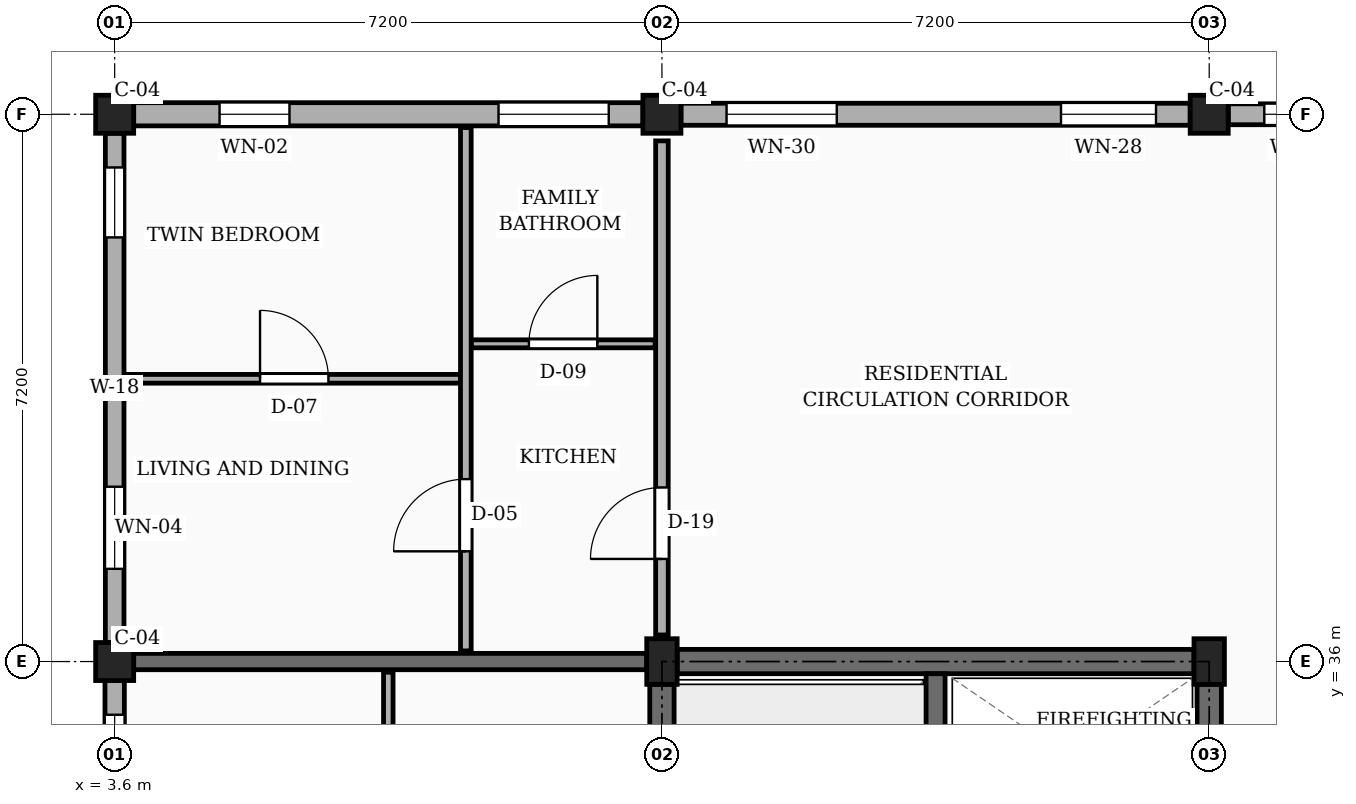
"""IFC4 building model, lengths in metres.
Left out: names, types, materials, properties, quantities, classifications, styles, units other than length and angle.
Written with IfcOpenShell. Run it as: python <this file> out.ifc"""

import sys

from ifc_helpers import new_model, si_unit, direction, frame, frame_2d, origin, origin_2d, place, context, subcontext, project, spatial, rectangle, extrude, element, fill, save


model = new_model("IFC4")
c1 = context("Model", 3, precision=1e-05, world=origin(), true_north=direction((0.0, 1.0)))
c2 = subcontext(c1, "Body", "Model", "MODEL_VIEW")
j1 = project(units=[si_unit("LENGTHUNIT", "METRE"), si_unit("PLANEANGLEUNIT", "RADIAN")], contexts=[c1])
p1 = place(None, origin())
s1 = spatial("IfcSite", under=j1, at=p1, CompositionType="ELEMENT")
p2 = place(p1, origin())
s2 = spatial("IfcBuilding", under=s1, at=p2, CompositionType="ELEMENT")
p3 = place(p2, frame((0.0, 0.0, 29.7)))
s3 = spatial("IfcBuildingStorey", under=s2, at=p3, CompositionType="ELEMENT", Elevation=29.7)
for number, where, z_axis, x_axis in (
    (1, (3.6, 36.0, 0.0), (0.0, 0.0, 1.0), (1.0, 0.0, 0.0)),
    (2, (3.6, 43.2, 0.0), (0.0, 0.0, 1.0), (1.0, 0.0, 0.0)),
):
    element("IfcColumn", number, at=place(p3, frame(where, z_axis=z_axis, x_axis=x_axis)), inside=s3, PredefinedType="COLUMN", context=c2, shape_type="SweptSolid", body=[
        extrude(rectangle(XDim=0.5, YDim=0.5, at=origin_2d()), origin(), (0.0, 0.0, 1.0), 3.15),
    ])
p4 = place(p3, frame((10.8, 36.0, 0.0), z_axis=(0.0, 0.0, 1.0), x_axis=(1.0, 0.0, 0.0)))
e3 = element("IfcColumn", 3, at=p4, inside=s3, PredefinedType="COLUMN", context=c2, shape_type="SweptSolid", body=[
    extrude(rectangle(XDim=0.4, YDim=0.6, at=origin_2d()), origin(), (0.0, 0.0, 1.0), 3.15),
])
p5 = place(p3, frame((10.8, 43.2, 0.0), z_axis=(0.0, 0.0, 1.0), x_axis=(1.0, 0.0, 0.0)))
e4 = element("IfcColumn", 4, at=p5, inside=s3, PredefinedType="COLUMN", context=c2, shape_type="SweptSolid", body=[
    extrude(rectangle(XDim=0.5, YDim=0.5, at=origin_2d()), origin(), (0.0, 0.0, 1.0), 3.15),
])
p6 = place(p3, frame((18.0, 36.0, 0.0), z_axis=(0.0, 0.0, 1.0), x_axis=(1.0, 0.0, 0.0)))
e5 = element("IfcColumn", 5, at=p6, inside=s3, PredefinedType="COLUMN", context=c2, shape_type="SweptSolid", body=[
    extrude(rectangle(XDim=0.4, YDim=0.6, at=origin_2d()), origin(), (0.0, 0.0, 1.0), 3.15),
])
p7 = place(p3, frame((18.0, 43.2, 0.0), z_axis=(0.0, 0.0, 1.0), x_axis=(1.0, 0.0, 0.0)))
e6 = element("IfcColumn", 6, at=p7, inside=s3, PredefinedType="COLUMN", context=c2, shape_type="SweptSolid", body=[
    extrude(rectangle(XDim=0.5, YDim=0.5, at=origin_2d()), origin(), (0.0, 0.0, 1.0), 3.15),
])
p8 = place(p3, frame((3.85, 36.0, 0.0), z_axis=(0.0, 0.0, 1.0), x_axis=(1.0, 0.0, 0.0)))
e7 = element("IfcWall", 7, at=p8, inside=s3, PredefinedType="SOLIDWALL", context=c2, shape_type="SweptSolid", body=[
    extrude(rectangle(XDim=6.75, YDim=0.215, at=frame_2d((3.375, 0.0))), origin(), (0.0, 0.0, 1.0), 2.17),
])
p9 = place(p3, frame((24.95, 43.2, 0.0), z_axis=(0.0, 0.0, 1.0), x_axis=(-1.0, 0.0, 0.0)))
e8 = element("IfcWall", 8, at=p9, inside=s3, PredefinedType="SOLIDWALL", context=c2, shape_type="SweptSolid", body=[
    extrude(rectangle(XDim=6.7, YDim=0.275, at=frame_2d((3.35, 0.0))), origin(), (0.0, 0.0, 1.0), 2.44),
])
p10 = place(p9, frame((0.495, 0.0, 0.78)))
e9 = element("IfcOpeningElement", 9, at=p10, cuts=e8, PredefinedType="OPENING", context=c2, shape_type="SweptSolid", body=[
    extrude(rectangle(XDim=0.94, YDim=1.44, at=frame_2d((0.47, 0.72))), frame((0.0, 0.147, 0.0), z_axis=(0.0, -1.0, 0.0), x_axis=(1.0, 0.0, 0.0)), (0.0, 0.0, 1.0), 0.295),
])
p11 = place(p9, frame((2.745, 0.0, 0.78)))
e10 = element("IfcOpeningElement", 10, at=p11, cuts=e8, PredefinedType="OPENING", context=c2, shape_type="SweptSolid", body=[
    extrude(rectangle(XDim=1.15, YDim=1.44, at=frame_2d((0.575, 0.72))), frame((0.0, 0.147, 0.0), z_axis=(0.0, -1.0, 0.0), x_axis=(1.0, 0.0, 0.0)), (0.0, 0.0, 1.0), 0.295),
])
p12 = place(p9, frame((5.185, 0.0, 0.78)))
e11 = element("IfcOpeningElement", 11, at=p12, cuts=e8, PredefinedType="OPENING", context=c2, shape_type="SweptSolid", body=[
    extrude(rectangle(XDim=1.04, YDim=1.26, at=frame_2d((0.52, 0.63))), frame((0.0, 0.147, 0.0), z_axis=(0.0, -1.0, 0.0), x_axis=(1.0, 0.0, 0.0)), (0.0, 0.0, 1.0), 0.295),
])
p13 = place(p3, frame((17.75, 43.2, 0.0), z_axis=(0.0, 0.0, 1.0), x_axis=(-1.0, 0.0, 0.0)))
e12 = element("IfcWall", 12, at=p13, inside=s3, PredefinedType="SOLIDWALL", context=c2, shape_type="SweptSolid", body=[
    extrude(rectangle(XDim=6.7, YDim=0.29, at=frame_2d((3.35, 0.0))), origin(), (0.0, 0.0, 1.0), 2.44),
])
p14 = place(p13, frame((0.45, 0.0, 0.78)))
e13 = element("IfcOpeningElement", 13, at=p14, cuts=e12, PredefinedType="OPENING", context=c2, shape_type="SweptSolid", body=[
    extrude(rectangle(XDim=1.25, YDim=1.44, at=frame_2d((0.625, 0.72))), frame((0.0, 0.155, 0.0), z_axis=(0.0, -1.0, 0.0), x_axis=(1.0, 0.0, 0.0)), (0.0, 0.0, 1.0), 0.31),
])
p15 = place(p13, frame((4.65, 0.0, 0.78)))
e14 = element("IfcOpeningElement", 14, at=p15, cuts=e12, PredefinedType="OPENING", context=c2, shape_type="SweptSolid", body=[
    extrude(rectangle(XDim=1.45, YDim=1.44, at=frame_2d((0.725, 0.72))), frame((0.0, 0.155, 0.0), z_axis=(0.0, -1.0, 0.0), x_axis=(1.0, 0.0, 0.0)), (0.0, 0.0, 1.0), 0.31),
])
p16 = place(p3, frame((10.55, 43.2, 0.0), z_axis=(0.0, 0.0, 1.0), x_axis=(-1.0, 0.0, 0.0)))
e15 = element("IfcWall", 15, at=p16, inside=s3, PredefinedType="SOLIDWALL", context=c2, shape_type="SweptSolid", body=[
    extrude(rectangle(XDim=6.7, YDim=0.305, at=frame_2d((3.35, 0.0))), origin(), (0.0, 0.0, 1.0), 2.44),
])
p17 = place(p16, frame((0.45, 0.0, 0.78)))
e16 = element("IfcOpeningElement", 16, at=p17, cuts=e15, PredefinedType="OPENING", context=c2, shape_type="SweptSolid", body=[
    extrude(rectangle(XDim=1.45, YDim=1.44, at=frame_2d((0.725, 0.72))), frame((0.0, 0.163, 0.0), z_axis=(0.0, -1.0, 0.0), x_axis=(1.0, 0.0, 0.0)), (0.0, 0.0, 1.0), 0.325),
])
p18 = place(p16, frame((4.65, 0.0, 0.78)))
e17 = element("IfcOpeningElement", 17, at=p18, cuts=e15, PredefinedType="OPENING", context=c2, shape_type="SweptSolid", body=[
    extrude(rectangle(XDim=0.92, YDim=1.15, at=frame_2d((0.46, 0.575))), frame((0.0, 0.163, 0.0), z_axis=(0.0, -1.0, 0.0), x_axis=(1.0, 0.0, 0.0)), (0.0, 0.0, 1.0), 0.325),
])
p19 = place(p3, frame((3.6, 42.95, 0.0), z_axis=(0.0, 0.0, 1.0), x_axis=(0.0, -1.0, 0.0)))
e18 = element("IfcWall", 18, at=p19, inside=s3, PredefinedType="SOLIDWALL", context=c2, shape_type="SweptSolid", body=[
    extrude(rectangle(XDim=6.7, YDim=0.245, at=frame_2d((3.35, 0.0))), origin(), (0.0, 0.0, 1.0), 2.44),
])
p20 = place(p19, frame((0.45, 0.0, 0.78)))
e19 = element("IfcOpeningElement", 19, at=p20, cuts=e18, PredefinedType="OPENING", context=c2, shape_type="SweptSolid", body=[
    extrude(rectangle(XDim=0.92, YDim=1.15, at=frame_2d((0.46, 0.575))), frame((0.0, 0.133, 0.0), z_axis=(0.0, -1.0, 0.0), x_axis=(1.0, 0.0, 0.0)), (0.0, 0.0, 1.0), 0.265),
])
p21 = place(p19, frame((4.65, 0.0, 0.78)))
e20 = element("IfcOpeningElement", 20, at=p21, cuts=e18, PredefinedType="OPENING", context=c2, shape_type="SweptSolid", body=[
    extrude(rectangle(XDim=1.08, YDim=1.15, at=frame_2d((0.54, 0.575))), frame((0.0, 0.133, 0.0), z_axis=(0.0, -1.0, 0.0), x_axis=(1.0, 0.0, 0.0)), (0.0, 0.0, 1.0), 0.265),
])
p22 = place(p3, frame((3.6, 35.75, 0.0), z_axis=(0.0, 0.0, 1.0), x_axis=(0.0, -1.0, 0.0)))
e21 = element("IfcWall", 21, at=p22, inside=s3, PredefinedType="SOLIDWALL", context=c2, shape_type="SweptSolid", body=[
    extrude(rectangle(XDim=6.7, YDim=0.255, at=frame_2d((3.35, 0.0))), origin(), (0.0, 0.0, 1.0), 2.44),
])
p23 = place(p22, frame((0.45, 0.0, 0.78)))
e22 = element("IfcOpeningElement", 22, at=p23, cuts=e21, PredefinedType="OPENING", context=c2, shape_type="SweptSolid", body=[
    extrude(rectangle(XDim=1.08, YDim=1.15, at=frame_2d((0.54, 0.575))), frame((0.0, 0.137, 0.0), z_axis=(0.0, -1.0, 0.0), x_axis=(1.0, 0.0, 0.0)), (0.0, 0.0, 1.0), 0.275),
])
p24 = place(p22, frame((4.65, 0.0, 0.78)))
e23 = element("IfcOpeningElement", 23, at=p24, cuts=e21, PredefinedType="OPENING", context=c2, shape_type="SweptSolid", body=[
    extrude(rectangle(XDim=1.24, YDim=1.15, at=frame_2d((0.62, 0.575))), frame((0.0, 0.137, 0.0), z_axis=(0.0, -1.0, 0.0), x_axis=(1.0, 0.0, 0.0)), (0.0, 0.0, 1.0), 0.275),
])
p25 = place(p3, frame((10.8, 29.1, 0.0), z_axis=(0.0, 0.0, 1.0), x_axis=(0.0, 1.0, 0.0)))
e24 = element("IfcWall", 24, at=p25, inside=s3, PredefinedType="SHEAR", context=c2, shape_type="SweptSolid", body=[
    extrude(rectangle(XDim=6.6, YDim=0.32, at=frame_2d((3.3, 0.0))), origin(), (0.0, 0.0, 1.0), 2.87),
])
p26 = place(p3, frame((11.0, 36.0, 0.0), z_axis=(0.0, 0.0, 1.0), x_axis=(1.0, 0.0, 0.0)))
e25 = element("IfcWall", 25, at=p26, inside=s3, PredefinedType="SHEAR", context=c2, shape_type="SweptSolid", body=[
    extrude(rectangle(XDim=6.8, YDim=0.32, at=frame_2d((3.4, 0.0))), origin(), (0.0, 0.0, 1.0), 2.87),
])
p27 = place(p3, frame((18.0, 29.1, 0.0), z_axis=(0.0, 0.0, 1.0), x_axis=(0.0, 1.0, 0.0)))
e26 = element("IfcWall", 26, at=p27, inside=s3, PredefinedType="SHEAR", context=c2, shape_type="SweptSolid", body=[
    extrude(rectangle(XDim=6.6, YDim=0.32, at=frame_2d((3.3, 0.0))), origin(), (0.0, 0.0, 1.0), 2.87),
])
p28 = place(p27, frame((1.5, 0.0, 0.0)))
e27 = element("IfcOpeningElement", 27, at=p28, cuts=e26, PredefinedType="OPENING", context=c2, shape_type="SweptSolid", body=[
    extrude(rectangle(XDim=1.1, YDim=2.15, at=frame_2d((0.55, 1.075))), frame((0.0, 0.17, 0.0), z_axis=(0.0, -1.0, 0.0), x_axis=(1.0, 0.0, 0.0)), (0.0, 0.0, 1.0), 0.34),
])
p29 = place(p3, frame((14.4, 28.96, 0.0), z_axis=(0.0, 0.0, 1.0), x_axis=(0.0, 1.0, 0.0)))
e28 = element("IfcWall", 28, at=p29, inside=s3, PredefinedType="SHEAR", context=c2, shape_type="SweptSolid", body=[
    extrude(rectangle(XDim=6.88, YDim=0.25, at=frame_2d((3.44, 0.0))), origin(), (0.0, 0.0, 1.0), 2.87),
])
p30 = place(p29, frame((0.44, 0.0, 0.0)))
e29 = element("IfcOpeningElement", 29, at=p30, cuts=e28, PredefinedType="OPENING", context=c2, shape_type="SweptSolid", body=[
    extrude(rectangle(XDim=1.05, YDim=2.15, at=frame_2d((0.525, 1.075))), frame((0.0, 0.135, 0.0), z_axis=(0.0, -1.0, 0.0), x_axis=(1.0, 0.0, 0.0)), (0.0, 0.0, 1.0), 0.27),
])
p31 = place(p3, frame((10.8, 36.35, 0.0), z_axis=(0.0, 0.0, 1.0), x_axis=(0.0, 1.0, 0.0)))
e30 = element("IfcWall", 30, at=p31, inside=s3, PredefinedType="PARTITIONING", context=c2, shape_type="SweptSolid", body=[
    extrude(rectangle(XDim=6.5, YDim=0.165, at=frame_2d((3.25, 0.0))), origin(), (0.0, 0.0, 1.0), 2.305),
])
p32 = place(p31, frame((1.0, 0.0, 0.0)))
e31 = element("IfcOpeningElement", 31, at=p32, cuts=e30, PredefinedType="OPENING", context=c2, shape_type="SweptSolid", body=[
    extrude(rectangle(XDim=0.94, YDim=2.12, at=frame_2d((0.47, 1.06))), frame((0.0, 0.093, 0.0), z_axis=(0.0, -1.0, 0.0), x_axis=(1.0, 0.0, 0.0)), (0.0, 0.0, 1.0), 0.185),
])
p33 = place(p3, frame((7.2, 28.94, 0.0), z_axis=(0.0, 0.0, 1.0), x_axis=(0.0, 1.0, 0.0)))
e32 = element("IfcWall", 32, at=p33, inside=s3, PredefinedType="PARTITIONING", context=c2, shape_type="SweptSolid", body=[
    extrude(rectangle(XDim=6.92, YDim=0.125, at=frame_2d((3.46, 0.0))), origin(), (0.0, 0.0, 1.0), 2.305),
])
p34 = place(p33, frame((1.05, 0.0, 0.0)))
e33 = element("IfcOpeningElement", 33, at=p34, cuts=e32, PredefinedType="OPENING", context=c2, shape_type="SweptSolid", body=[
    extrude(rectangle(XDim=0.87, YDim=2.05, at=frame_2d((0.435, 1.025))), frame((0.0, 0.073, 0.0), z_axis=(0.0, -1.0, 0.0), x_axis=(1.0, 0.0, 0.0)), (0.0, 0.0, 1.0), 0.145),
])
p35 = place(p33, frame((4.45, 0.0, 0.0)))
e34 = element("IfcOpeningElement", 34, at=p35, cuts=e32, PredefinedType="OPENING", context=c2, shape_type="SweptSolid", body=[
    extrude(rectangle(XDim=0.88, YDim=2.08, at=frame_2d((0.44, 1.04))), frame((0.0, 0.073, 0.0), z_axis=(0.0, -1.0, 0.0), x_axis=(1.0, 0.0, 0.0)), (0.0, 0.0, 1.0), 0.145),
])
p36 = place(p3, frame((3.775, 39.72, 0.0), z_axis=(0.0, 0.0, 1.0), x_axis=(1.0, 0.0, 0.0)))
e35 = element("IfcWall", 35, at=p36, inside=s3, PredefinedType="PARTITIONING", context=c2, shape_type="SweptSolid", body=[
    extrude(rectangle(XDim=4.375, YDim=0.115, at=frame_2d((2.188, 0.0))), origin(), (0.0, 0.0, 1.0), 2.305),
])
p37 = place(p36, frame((1.738, 0.0, 0.0)))
e36 = element("IfcOpeningElement", 36, at=p37, cuts=e35, PredefinedType="OPENING", context=c2, shape_type="SweptSolid", body=[
    extrude(rectangle(XDim=0.9, YDim=2.1, at=frame_2d((0.45, 1.05))), frame((0.0, 0.067, 0.0), z_axis=(0.0, -1.0, 0.0), x_axis=(1.0, 0.0, 0.0)), (0.0, 0.0, 1.0), 0.135),
])
p38 = place(p3, frame((8.29, 40.18, 0.0), z_axis=(0.0, 0.0, 1.0), x_axis=(1.0, 0.0, 0.0)))
e37 = element("IfcWall", 37, at=p38, inside=s3, PredefinedType="PARTITIONING", context=c2, shape_type="SweptSolid", body=[
    extrude(rectangle(XDim=2.42, YDim=0.105, at=frame_2d((1.21, 0.0))), origin(), (0.0, 0.0, 1.0), 2.305),
])
p39 = place(p38, frame((0.76, 0.0, 0.0)))
e38 = element("IfcOpeningElement", 38, at=p39, cuts=e37, PredefinedType="OPENING", context=c2, shape_type="SweptSolid", body=[
    extrude(rectangle(XDim=0.9, YDim=2.05, at=frame_2d((0.45, 1.025))), frame((0.0, 0.062, 0.0), z_axis=(0.0, -1.0, 0.0), x_axis=(1.0, 0.0, 0.0)), (0.0, 0.0, 1.0), 0.125),
])
p40 = place(p3, frame((8.22, 36.14, 0.0), z_axis=(0.0, 0.0, 1.0), x_axis=(0.0, 1.0, 0.0)))
e39 = element("IfcWall", 39, at=p40, inside=s3, PredefinedType="PARTITIONING", context=c2, shape_type="SweptSolid", body=[
    extrude(rectangle(XDim=6.885, YDim=0.14, at=frame_2d((3.442, 0.0))), origin(), (0.0, 0.0, 1.0), 2.305),
])
p41 = place(p40, frame((1.31, 0.0, 0.0)))
e40 = element("IfcOpeningElement", 40, at=p41, cuts=e39, PredefinedType="OPENING", context=c2, shape_type="SweptSolid", body=[
    extrude(rectangle(XDim=0.95, YDim=2.1, at=frame_2d((0.475, 1.05))), frame((0.0, 0.08, 0.0), z_axis=(0.0, -1.0, 0.0), x_axis=(1.0, 0.0, 0.0)), (0.0, 0.0, 1.0), 0.16),
])
p42 = place(p12, origin())
e41 = element("IfcWindow", 41, at=p42, inside=s3, PartitioningType="SINGLE_PANEL", PredefinedType="WINDOW", context=c2, shape_type="SweptSolid", body=[
    extrude(rectangle(XDim=1.04, YDim=1.26, at=frame_2d((0.52, 0.63))), frame((0.0, 0.03, 0.0), z_axis=(0.0, -1.0, 0.0), x_axis=(1.0, 0.0, 0.0)), (0.0, 0.0, 1.0), 0.06),
])
fill(e11, e41)
p43 = place(p14, origin())
e42 = element("IfcWindow", 42, at=p43, inside=s3, PartitioningType="SINGLE_PANEL", PredefinedType="WINDOW", context=c2, shape_type="SweptSolid", body=[
    extrude(rectangle(XDim=1.25, YDim=1.44, at=frame_2d((0.625, 0.72))), frame((0.0, 0.03, 0.0), z_axis=(0.0, -1.0, 0.0), x_axis=(1.0, 0.0, 0.0)), (0.0, 0.0, 1.0), 0.06),
])
fill(e13, e42)
p44 = place(p15, origin())
e43 = element("IfcWindow", 43, at=p44, inside=s3, PartitioningType="SINGLE_PANEL", PredefinedType="WINDOW", context=c2, shape_type="SweptSolid", body=[
    extrude(rectangle(XDim=1.45, YDim=1.44, at=frame_2d((0.725, 0.72))), frame((0.0, 0.03, 0.0), z_axis=(0.0, -1.0, 0.0), x_axis=(1.0, 0.0, 0.0)), (0.0, 0.0, 1.0), 0.06),
])
fill(e14, e43)
p45 = place(p17, origin())
e44 = element("IfcWindow", 44, at=p45, inside=s3, PartitioningType="SINGLE_PANEL", PredefinedType="WINDOW", context=c2, shape_type="SweptSolid", body=[
    extrude(rectangle(XDim=1.45, YDim=1.44, at=frame_2d((0.725, 0.72))), frame((0.0, 0.03, 0.0), z_axis=(0.0, -1.0, 0.0), x_axis=(1.0, 0.0, 0.0)), (0.0, 0.0, 1.0), 0.06),
])
fill(e16, e44)
p46 = place(p18, origin())
e45 = element("IfcWindow", 45, at=p46, inside=s3, PartitioningType="SINGLE_PANEL", PredefinedType="WINDOW", context=c2, shape_type="SweptSolid", body=[
    extrude(rectangle(XDim=0.92, YDim=1.15, at=frame_2d((0.46, 0.575))), frame((0.0, 0.03, 0.0), z_axis=(0.0, -1.0, 0.0), x_axis=(1.0, 0.0, 0.0)), (0.0, 0.0, 1.0), 0.06),
])
fill(e17, e45)
p47 = place(p20, origin())
e46 = element("IfcWindow", 46, at=p47, inside=s3, PartitioningType="SINGLE_PANEL", PredefinedType="WINDOW", context=c2, shape_type="SweptSolid", body=[
    extrude(rectangle(XDim=0.92, YDim=1.15, at=frame_2d((0.46, 0.575))), frame((0.0, 0.03, 0.0), z_axis=(0.0, -1.0, 0.0), x_axis=(1.0, 0.0, 0.0)), (0.0, 0.0, 1.0), 0.06),
])
fill(e19, e46)
p48 = place(p21, origin())
e47 = element("IfcWindow", 47, at=p48, inside=s3, PartitioningType="SINGLE_PANEL", PredefinedType="WINDOW", context=c2, shape_type="SweptSolid", body=[
    extrude(rectangle(XDim=1.08, YDim=1.15, at=frame_2d((0.54, 0.575))), frame((0.0, 0.03, 0.0), z_axis=(0.0, -1.0, 0.0), x_axis=(1.0, 0.0, 0.0)), (0.0, 0.0, 1.0), 0.06),
])
fill(e20, e47)
p49 = place(p23, origin())
e48 = element("IfcWindow", 48, at=p49, inside=s3, PartitioningType="SINGLE_PANEL", PredefinedType="WINDOW", context=c2, shape_type="SweptSolid", body=[
    extrude(rectangle(XDim=1.08, YDim=1.15, at=frame_2d((0.54, 0.575))), frame((0.0, 0.03, 0.0), z_axis=(0.0, -1.0, 0.0), x_axis=(1.0, 0.0, 0.0)), (0.0, 0.0, 1.0), 0.06),
])
fill(e22, e48)
p50 = place(p32, origin())
e49 = element("IfcDoor", 49, at=p50, inside=s3, OperationType="SINGLE_SWING_LEFT", PredefinedType="DOOR", context=c2, shape_type="SweptSolid", body=[
    extrude(rectangle(XDim=0.94, YDim=2.12, at=frame_2d((0.47, 1.06))), frame((0.0, 0.025, 0.0), z_axis=(0.0, -1.0, 0.0), x_axis=(1.0, 0.0, 0.0)), (0.0, 0.0, 1.0), 0.05),
])
fill(e31, e49)
p51 = place(p37, origin())
e50 = element("IfcDoor", 50, at=p51, inside=s3, OperationType="SINGLE_SWING_LEFT", PredefinedType="DOOR", context=c2, shape_type="SweptSolid", body=[
    extrude(rectangle(XDim=0.9, YDim=2.1, at=frame_2d((0.45, 1.05))), frame((0.0, 0.025, 0.0), z_axis=(0.0, -1.0, 0.0), x_axis=(1.0, 0.0, 0.0)), (0.0, 0.0, 1.0), 0.05),
])
fill(e36, e50)
p52 = place(p39, origin())
e51 = element("IfcDoor", 51, at=p52, inside=s3, OperationType="SINGLE_SWING_RIGHT", PredefinedType="DOOR", context=c2, shape_type="SweptSolid", body=[
    extrude(rectangle(XDim=0.9, YDim=2.05, at=frame_2d((0.45, 1.025))), frame((0.0, 0.025, 0.0), z_axis=(0.0, -1.0, 0.0), x_axis=(1.0, 0.0, 0.0)), (0.0, 0.0, 1.0), 0.05),
])
fill(e38, e51)
p53 = place(p41, origin())
e52 = element("IfcDoor", 52, at=p53, inside=s3, OperationType="SINGLE_SWING_LEFT", PredefinedType="DOOR", context=c2, shape_type="SweptSolid", body=[
    extrude(rectangle(XDim=0.95, YDim=2.1, at=frame_2d((0.475, 1.05))), frame((0.0, 0.025, 0.0), z_axis=(0.0, -1.0, 0.0), x_axis=(1.0, 0.0, 0.0)), (0.0, 0.0, 1.0), 0.05),
])
fill(e40, e52)
save(model, sys.argv[1])
